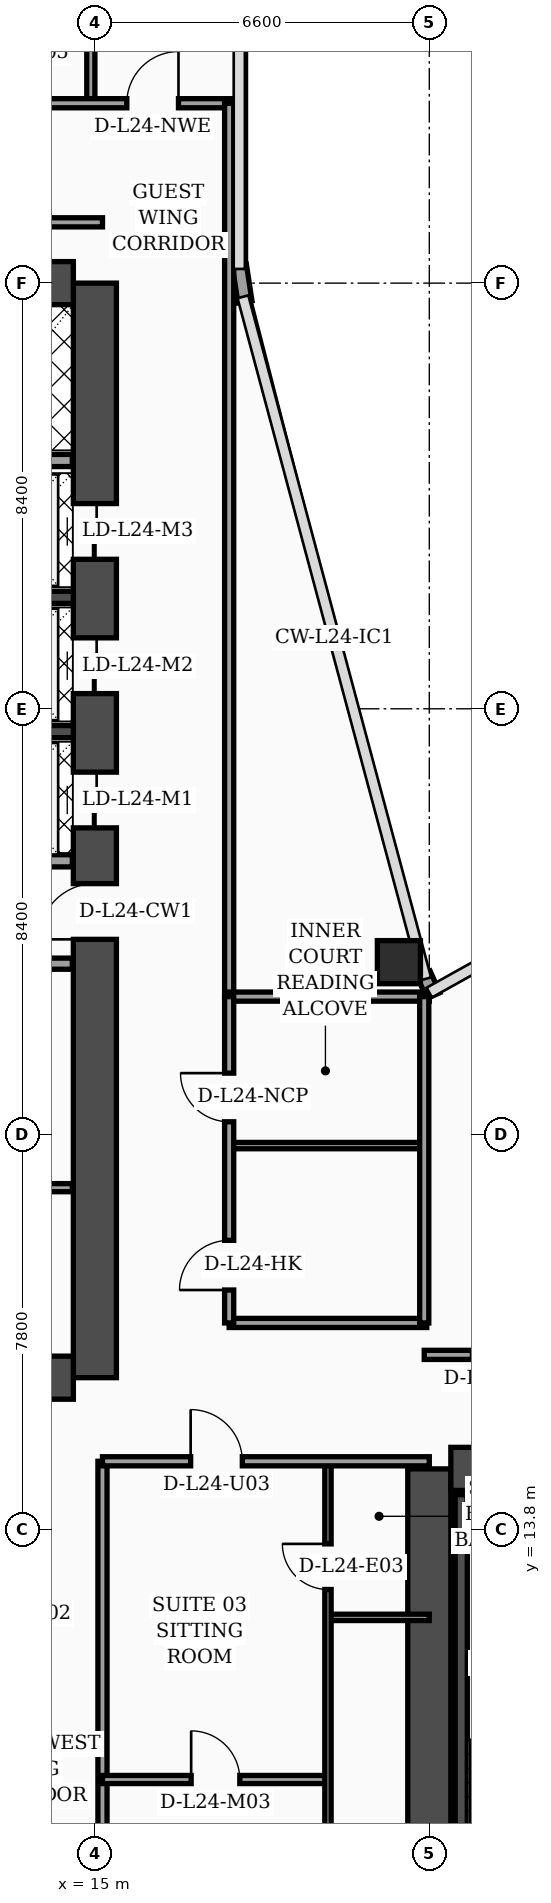
"""IFC4 building model, lengths in metres.
Left out: names, types, materials, properties, quantities, classifications, styles, units other than length and angle.
Written with IfcOpenShell. Run it as: python <this file> out.ifc"""

import sys

from ifc_helpers import new_model, si_unit, direction, frame, frame_2d, origin, origin_2d, place, context, subcontext, project, spatial, rectangle, hollow_rectangle, extrude, element, fill, save


model = new_model("IFC4")
c1 = context("Model", 3, precision=1e-05, world=origin(), true_north=direction((0.0, 1.0)))
c2 = subcontext(c1, "Body", "Model", "MODEL_VIEW")
j1 = project(units=[si_unit("LENGTHUNIT", "METRE"), si_unit("PLANEANGLEUNIT", "RADIAN")], contexts=[c1])
p1 = place(None, origin())
s1 = spatial("IfcSite", under=j1, at=p1, CompositionType="ELEMENT")
p2 = place(p1, origin())
s2 = spatial("IfcBuilding", under=s1, at=p2, CompositionType="ELEMENT")
p3 = place(p2, frame((0.0, 0.0, 101.2)))
s3 = spatial("IfcBuildingStorey", under=s2, at=p3, CompositionType="ELEMENT", Elevation=101.2)
p4 = place(p3, frame((15.0, 16.8, 0.0), z_axis=(0.0, 0.0, 1.0), x_axis=(0.0, 1.0, 0.0)))
e1 = element("IfcWall", 1, at=p4, inside=s3, PredefinedType="SHEAR", context=c2, shape_type="SweptSolid", body=[
    extrude(rectangle(XDim=21.6, YDim=0.85, at=frame_2d((10.8, 0.0))), origin(), (0.0, 0.0, 1.0), 3.56),
])
p5 = place(p4, frame((8.65, 0.0, 0.0)))
e2 = element("IfcOpeningElement", 2, at=p5, cuts=e1, PredefinedType="OPENING", context=c2, shape_type="SweptSolid", body=[
    extrude(rectangle(XDim=1.1, YDim=2.2, at=frame_2d((0.55, 1.1))), frame((0.0, 0.435, 0.0), z_axis=(0.0, -1.0, 0.0), x_axis=(1.0, 0.0, 0.0)), (0.0, 0.0, 1.0), 0.87),
])
p6 = place(p4, frame((10.85, 0.0, 0.0)))
e3 = element("IfcOpeningElement", 3, at=p6, cuts=e1, PredefinedType="OPENING", context=c2, shape_type="SweptSolid", body=[
    extrude(rectangle(XDim=1.1, YDim=2.2, at=frame_2d((0.55, 1.1))), frame((0.0, 0.435, 0.0), z_axis=(0.0, -1.0, 0.0), x_axis=(1.0, 0.0, 0.0)), (0.0, 0.0, 1.0), 0.87),
])
p7 = place(p4, frame((13.5, 0.0, 0.0)))
e4 = element("IfcOpeningElement", 4, at=p7, cuts=e1, PredefinedType="OPENING", context=c2, shape_type="SweptSolid", body=[
    extrude(rectangle(XDim=1.1, YDim=2.2, at=frame_2d((0.55, 1.1))), frame((0.0, 0.435, 0.0), z_axis=(0.0, -1.0, 0.0), x_axis=(1.0, 0.0, 0.0)), (0.0, 0.0, 1.0), 0.87),
])
p8 = place(p4, frame((16.15, 0.0, 0.0)))
e5 = element("IfcOpeningElement", 5, at=p8, cuts=e1, PredefinedType="OPENING", context=c2, shape_type="SweptSolid", body=[
    extrude(rectangle(XDim=1.1, YDim=2.2, at=frame_2d((0.55, 1.1))), frame((0.0, 0.435, 0.0), z_axis=(0.0, -1.0, 0.0), x_axis=(1.0, 0.0, 0.0)), (0.0, 0.0, 1.0), 0.87),
])
for number, where, z_axis, x_axis in (
    (6, (4.625, 38.4, 0.0), (0.0, 0.0, 1.0), (1.0, 0.0, 0.0)),
    (7, (4.625, 16.8, 0.0), (0.0, 0.0, 1.0), (1.0, 0.0, 0.0)),
):
    element("IfcWall", number, at=place(p3, frame(where, z_axis=z_axis, x_axis=x_axis)), inside=s3, PredefinedType="SHEAR", context=c2, shape_type="SweptSolid", body=[
        extrude(rectangle(XDim=9.95, YDim=0.85, at=frame_2d((4.975, 0.0))), origin(), (0.0, 0.0, 1.0), 3.56),
    ])
p9 = place(p3, frame((21.6, 4.6, 0.0), z_axis=(0.0, 0.0, 1.0), x_axis=(0.0, 1.0, 0.0)))
e8 = element("IfcWall", 8, at=p9, inside=s3, PredefinedType="SHEAR", context=c2, shape_type="SweptSolid", body=[
    extrude(rectangle(XDim=10.4, YDim=0.85, at=frame_2d((5.2, 0.0))), origin(), (0.0, 0.0, 1.0), 3.56),
])
p10 = place(p3, frame((22.025, 15.0, 0.0), z_axis=(0.0, 0.0, 1.0), x_axis=(1.0, 0.0, 0.0)))
e9 = element("IfcWall", 9, at=p10, inside=s3, PredefinedType="SHEAR", context=c2, shape_type="SweptSolid", body=[
    extrude(rectangle(XDim=9.95, YDim=0.85, at=frame_2d((4.975, 0.0))), origin(), (0.0, 0.0, 1.0), 3.56),
])
p11 = place(p10, frame((4.88, 0.0, 0.0)))
e10 = element("IfcOpeningElement", 10, at=p11, cuts=e9, PredefinedType="OPENING", context=c2, shape_type="SweptSolid", body=[
    extrude(rectangle(XDim=1.1, YDim=2.2, at=frame_2d((0.55, 1.1))), frame((0.0, 0.435, 0.0), z_axis=(0.0, -1.0, 0.0), x_axis=(1.0, 0.0, 0.0)), (0.0, 0.0, 1.0), 0.87),
])
p12 = place(p3, frame((22.23, 5.025, 0.0), z_axis=(0.0, 0.0, 1.0), x_axis=(0.0, 1.0, 0.0)))
e11 = element("IfcWall", 11, at=p12, inside=s3, PredefinedType="SOLIDWALL", context=c2, shape_type="SweptSolid", body=[
    extrude(rectangle(XDim=9.465, YDim=0.24, at=frame_2d((4.732, 0.0))), origin(), (0.0, 0.0, 1.0), 3.56),
])
p13 = place(p3, frame((22.35, 14.37, 0.0), z_axis=(0.0, 0.0, 1.0), x_axis=(1.0, 0.0, 0.0)))
e12 = element("IfcWall", 12, at=p13, inside=s3, PredefinedType="SOLIDWALL", context=c2, shape_type="SweptSolid", body=[
    extrude(rectangle(XDim=3.1, YDim=0.24, at=frame_2d((1.55, 0.0))), origin(), (0.0, 0.0, 1.0), 3.56),
])
for number, where, z_axis, x_axis in (
    (13, (12.18, 29.55, 0.0), (0.0, 0.0, 1.0), (1.0, 0.0, 0.0)),
    (14, (12.18, 32.2, 0.0), (0.0, 0.0, 1.0), (1.0, 0.0, 0.0)),
):
    element("IfcWall", number, at=place(p3, frame(where, z_axis=z_axis, x_axis=x_axis)), inside=s3, PredefinedType="SOLIDWALL", context=c2, shape_type="SweptSolid", body=[
        extrude(rectangle(XDim=2.395, YDim=0.24, at=frame_2d((1.198, 0.0))), origin(), (0.0, 0.0, 1.0), 3.56),
    ])
p14 = place(p3, frame((21.0, 25.0, 0.0), z_axis=(0.0, 0.0, 1.0), x_axis=(1.0, 0.0, 0.0)))
e15 = element("IfcColumn", 15, at=p14, inside=s3, PredefinedType="COLUMN", context=c2, shape_type="SweptSolid", body=[
    extrude(hollow_rectangle(XDim=0.85, YDim=0.85, WallThickness=0.036, at=origin_2d()), origin(), (0.0, 0.0, 1.0), 3.56),
])
p15 = place(p3, frame((21.68, 24.34, 0.0), z_axis=(0.0, 0.0, 1.0), x_axis=(-0.40758134973, 0.913168901875, 0.0)))
e16 = element("IfcWall", 16, at=p15, inside=s3, PredefinedType="SOLIDWALL", context=c2, shape_type="SweptSolid", body=[
    extrude(rectangle(XDim=0.471, YDim=0.28, at=frame_2d((0.235, 0.0))), origin(), (0.0, 0.0, 1.0), 3.56),
])
p16 = place(p3, frame((17.962, 38.03, 0.0), z_axis=(0.0, 0.0, 1.0), x_axis=(-0.15141125477, 0.988470855377, 0.0)))
e17 = element("IfcWall", 17, at=p16, inside=s3, PredefinedType="SOLIDWALL", context=c2, shape_type="SweptSolid", body=[
    extrude(rectangle(XDim=0.739, YDim=0.28, at=frame_2d((0.369, 0.0))), origin(), (0.0, 0.0, 1.0), 3.56),
])
p17 = place(p3, frame((9.68, 20.55, 0.0), z_axis=(0.0, 0.0, 1.0), x_axis=(1.0, 0.0, 0.0)))
e18 = element("IfcWall", 18, at=p17, inside=s3, PredefinedType="PARTITIONING", context=c2, shape_type="SweptSolid", body=[
    extrude(rectangle(XDim=4.875, YDim=0.16, at=frame_2d((2.438, 0.0))), origin(), (0.0, 0.0, 1.0), 3.56),
])
p18 = place(p17, frame((1.1, 0.0, 0.0)))
e19 = element("IfcOpeningElement", 19, at=p18, cuts=e18, PredefinedType="OPENING", context=c2, shape_type="SweptSolid", body=[
    extrude(rectangle(XDim=0.98, YDim=2.15, at=frame_2d((0.49, 1.075))), frame((0.0, 0.09, 0.0), z_axis=(0.0, -1.0, 0.0), x_axis=(1.0, 0.0, 0.0)), (0.0, 0.0, 1.0), 0.18),
])
p19 = place(p3, frame((9.68, 24.97, 0.0), z_axis=(0.0, 0.0, 1.0), x_axis=(1.0, 0.0, 0.0)))
e20 = element("IfcWall", 20, at=p19, inside=s3, PredefinedType="SOLIDWALL", context=c2, shape_type="SweptSolid", body=[
    extrude(rectangle(XDim=4.875, YDim=0.22, at=frame_2d((2.438, 0.0))), origin(), (0.0, 0.0, 1.0), 2.84),
])
p20 = place(p19, frame((0.9, 0.0, 0.0)))
e21 = element("IfcOpeningElement", 21, at=p20, cuts=e20, PredefinedType="OPENING", context=c2, shape_type="SweptSolid", body=[
    extrude(rectangle(XDim=0.98, YDim=2.15, at=frame_2d((0.49, 1.075))), frame((0.0, 0.12, 0.0), z_axis=(0.0, -1.0, 0.0), x_axis=(1.0, 0.0, 0.0)), (0.0, 0.0, 1.0), 0.24),
])
p21 = place(p3, frame((12.25, 27.0, 0.0), z_axis=(0.0, 0.0, 1.0), x_axis=(1.0, 0.0, 0.0)))
e22 = element("IfcWall", 22, at=p21, inside=s3, PredefinedType="SOLIDWALL", context=c2, shape_type="SweptSolid", body=[
    extrude(rectangle(XDim=2.305, YDim=0.24, at=frame_2d((1.152, 0.0))), origin(), (0.0, 0.0, 1.0), 3.56),
])
p22 = place(p3, frame((9.66, 34.9, 0.0), z_axis=(0.0, 0.0, 1.0), x_axis=(1.0, 0.0, 0.0)))
e23 = element("IfcWall", 23, at=p22, inside=s3, PredefinedType="SOLIDWALL", context=c2, shape_type="SweptSolid", body=[
    extrude(rectangle(XDim=4.895, YDim=0.24, at=frame_2d((2.448, 0.0))), origin(), (0.0, 0.0, 1.0), 3.56),
])
p23 = place(p3, frame((15.15, 2.44, 0.0), z_axis=(0.0, 0.0, 1.0), x_axis=(0.0, 1.0, 0.0)))
e24 = element("IfcWall", 24, at=p23, inside=s3, PredefinedType="PARTITIONING", context=c2, shape_type="SweptSolid", body=[
    extrude(rectangle(XDim=12.71, YDim=0.18, at=frame_2d((6.355, 0.0))), origin(), (0.0, 0.0, 1.0), 3.04),
])
p24 = place(p3, frame((19.6, 12.07, 0.0), z_axis=(0.0, 0.0, 1.0), x_axis=(1.0, 0.0, 0.0)))
e25 = element("IfcWall", 25, at=p24, inside=s3, PredefinedType="PARTITIONING", context=c2, shape_type="SweptSolid", body=[
    extrude(rectangle(XDim=2.0, YDim=0.125, at=frame_2d((1.0, 0.0))), origin(), (0.0, 0.0, 1.0), 3.56),
])
p25 = place(p3, frame((15.15, 8.87, 0.0), z_axis=(0.0, 0.0, 1.0), x_axis=(1.0, 0.0, 0.0)))
e26 = element("IfcWall", 26, at=p25, inside=s3, PredefinedType="PARTITIONING", context=c2, shape_type="SweptSolid", body=[
    extrude(rectangle(XDim=4.45, YDim=0.16, at=frame_2d((2.225, 0.0))), origin(), (0.0, 0.0, 1.0), 3.56),
])
p26 = place(p25, frame((1.75, 0.0, 0.0)))
e27 = element("IfcOpeningElement", 27, at=p26, cuts=e26, PredefinedType="OPENING", context=c2, shape_type="SweptSolid", body=[
    extrude(rectangle(XDim=0.96, YDim=2.2, at=frame_2d((0.48, 1.1))), frame((0.0, 0.09, 0.0), z_axis=(0.0, -1.0, 0.0), x_axis=(1.0, 0.0, 0.0)), (0.0, 0.0, 1.0), 0.18),
])
p27 = place(p3, frame((19.6, 2.44, 0.0), z_axis=(0.0, 0.0, 1.0), x_axis=(0.0, 1.0, 0.0)))
e28 = element("IfcWall", 28, at=p27, inside=s3, PredefinedType="PARTITIONING", context=c2, shape_type="SweptSolid", body=[
    extrude(rectangle(XDim=12.71, YDim=0.125, at=frame_2d((6.355, 0.0))), origin(), (0.0, 0.0, 1.0), 2.49),
])
p28 = place(p27, frame((4.34, 0.0, 0.0)))
e29 = element("IfcOpeningElement", 29, at=p28, cuts=e28, PredefinedType="OPENING", context=c2, shape_type="SweptSolid", body=[
    extrude(rectangle(XDim=0.96, YDim=2.2, at=frame_2d((0.48, 1.1))), frame((0.0, 0.073, 0.0), z_axis=(0.0, -1.0, 0.0), x_axis=(1.0, 0.0, 0.0)), (0.0, 0.0, 1.0), 0.145),
])
p29 = place(p27, frame((10.18, 0.0, 0.0)))
e30 = element("IfcOpeningElement", 30, at=p29, cuts=e28, PredefinedType="OPENING", context=c2, shape_type="SweptSolid", body=[
    extrude(rectangle(XDim=0.9, YDim=2.15, at=frame_2d((0.45, 1.075))), frame((0.0, 0.073, 0.0), z_axis=(0.0, -1.0, 0.0), x_axis=(1.0, 0.0, 0.0)), (0.0, 0.0, 1.0), 0.145),
])
p30 = place(p3, frame((15.15, 15.15, 0.0), z_axis=(0.0, 0.0, 1.0), x_axis=(1.0, 0.0, 0.0)))
e31 = element("IfcWall", 31, at=p30, inside=s3, PredefinedType="PARTITIONING", context=c2, shape_type="SweptSolid", body=[
    extrude(rectangle(XDim=6.45, YDim=0.18, at=frame_2d((3.225, 0.0))), origin(), (0.0, 0.0, 1.0), 2.49),
])
p31 = place(p30, frame((1.74, 0.0, 0.0)))
e32 = element("IfcOpeningElement", 32, at=p31, cuts=e31, PredefinedType="OPENING", context=c2, shape_type="SweptSolid", body=[
    extrude(rectangle(XDim=1.02, YDim=2.2, at=frame_2d((0.51, 1.1))), frame((0.0, 0.1, 0.0), z_axis=(0.0, -1.0, 0.0), x_axis=(1.0, 0.0, 0.0)), (0.0, 0.0, 1.0), 0.2),
])
p32 = place(p3, frame((14.92, 41.95, 0.0), z_axis=(0.0, 0.0, 1.0), x_axis=(0.0, 1.0, 0.0)))
e33 = element("IfcWall", 33, at=p32, inside=s3, PredefinedType="PARTITIONING", context=c2, shape_type="SweptSolid", body=[
    extrude(rectangle(XDim=5.85, YDim=0.16, at=frame_2d((2.925, 0.0))), origin(), (0.0, 0.0, 1.0), 3.04),
])
p33 = place(p3, frame((0.08, 41.95, 0.0), z_axis=(0.0, 0.0, 1.0), x_axis=(1.0, 0.0, 0.0)))
e34 = element("IfcWall", 34, at=p33, inside=s3, PredefinedType="PARTITIONING", context=c2, shape_type="SweptSolid", body=[
    extrude(rectangle(XDim=17.77, YDim=0.18, at=frame_2d((8.885, 0.0))), origin(), (0.0, 0.0, 1.0), 2.84),
])
p34 = place(p33, frame((0.9, 0.0, 0.0)))
e35 = element("IfcOpeningElement", 35, at=p34, cuts=e34, PredefinedType="OPENING", context=c2, shape_type="SweptSolid", body=[
    extrude(rectangle(XDim=1.02, YDim=2.2, at=frame_2d((0.51, 1.1))), frame((0.0, 0.1, 0.0), z_axis=(0.0, -1.0, 0.0), x_axis=(1.0, 0.0, 0.0)), (0.0, 0.0, 1.0), 0.2),
])
p35 = place(p33, frame((4.45, 0.0, 0.0)))
e36 = element("IfcOpeningElement", 36, at=p35, cuts=e34, PredefinedType="OPENING", context=c2, shape_type="SweptSolid", body=[
    extrude(rectangle(XDim=1.02, YDim=2.2, at=frame_2d((0.51, 1.1))), frame((0.0, 0.1, 0.0), z_axis=(0.0, -1.0, 0.0), x_axis=(1.0, 0.0, 0.0)), (0.0, 0.0, 1.0), 0.2),
])
p36 = place(p33, frame((10.33, 0.0, 0.0)))
e37 = element("IfcOpeningElement", 37, at=p36, cuts=e34, PredefinedType="OPENING", context=c2, shape_type="SweptSolid", body=[
    extrude(rectangle(XDim=1.02, YDim=2.2, at=frame_2d((0.51, 1.1))), frame((0.0, 0.1, 0.0), z_axis=(0.0, -1.0, 0.0), x_axis=(1.0, 0.0, 0.0)), (0.0, 0.0, 1.0), 0.2),
])
p37 = place(p33, frame((15.55, 0.0, 0.0)))
e38 = element("IfcOpeningElement", 38, at=p37, cuts=e34, PredefinedType="OPENING", context=c2, shape_type="SweptSolid", body=[
    extrude(rectangle(XDim=1.02, YDim=2.2, at=frame_2d((0.51, 1.1))), frame((0.0, 0.1, 0.0), z_axis=(0.0, -1.0, 0.0), x_axis=(1.0, 0.0, 0.0)), (0.0, 0.0, 1.0), 0.2),
])
p38 = place(p3, frame((17.65, 24.3, 0.0), z_axis=(0.0, 0.0, 1.0), x_axis=(0.0, 1.0, 0.0)))
e39 = element("IfcWall", 39, at=p38, inside=s3, PredefinedType="PARTITIONING", context=c2, shape_type="SweptSolid", body=[
    extrude(rectangle(XDim=17.65, YDim=0.18, at=frame_2d((8.825, 0.0))), origin(), (0.0, 0.0, 1.0), 2.84),
])
p39 = place(p3, frame((3.755, 39.6, 0.0), z_axis=(0.0, 0.0, 1.0), x_axis=(1.0, 0.0, 0.0)))
e40 = element("IfcWall", 40, at=p39, inside=s3, PredefinedType="PARTITIONING", context=c2, shape_type="SweptSolid", body=[
    extrude(rectangle(XDim=11.395, YDim=0.18, at=frame_2d((5.698, 0.0))), origin(), (0.0, 0.0, 1.0), 2.84),
])
p40 = place(p3, frame((17.65, 17.88, 0.0), z_axis=(0.0, 0.0, 1.0), x_axis=(1.0, 0.0, 0.0)))
e41 = element("IfcWall", 41, at=p40, inside=s3, PredefinedType="PARTITIONING", context=c2, shape_type="SweptSolid", body=[
    extrude(rectangle(XDim=3.9, YDim=0.18, at=frame_2d((1.95, 0.0))), origin(), (0.0, 0.0, 1.0), 3.09),
])
p41 = place(p3, frame((17.65, 21.38, 0.0), z_axis=(0.0, 0.0, 1.0), x_axis=(1.0, 0.0, 0.0)))
e42 = element("IfcWall", 42, at=p41, inside=s3, PredefinedType="PARTITIONING", context=c2, shape_type="SweptSolid", body=[
    extrude(rectangle(XDim=3.9, YDim=0.125, at=frame_2d((1.95, 0.0))), origin(), (0.0, 0.0, 1.0), 3.56),
])
p42 = place(p3, frame((17.65, 24.32, 0.0), z_axis=(0.0, 0.0, 1.0), x_axis=(1.0, 0.0, 0.0)))
e43 = element("IfcWall", 43, at=p42, inside=s3, PredefinedType="PARTITIONING", context=c2, shape_type="SweptSolid", body=[
    extrude(rectangle(XDim=3.95, YDim=0.18, at=frame_2d((1.975, 0.0))), origin(), (0.0, 0.0, 1.0), 3.56),
])
p43 = place(p3, frame((21.5, 17.88, 0.0), z_axis=(0.0, 0.0, 1.0), x_axis=(0.0, 1.0, 0.0)))
e44 = element("IfcWall", 44, at=p43, inside=s3, PredefinedType="PARTITIONING", context=c2, shape_type="SweptSolid", body=[
    extrude(rectangle(XDim=6.44, YDim=0.18, at=frame_2d((3.22, 0.0))), origin(), (0.0, 0.0, 1.0), 3.09),
])
p44 = place(p3, frame((17.65, 17.88, 0.0), z_axis=(0.0, 0.0, 1.0), x_axis=(0.0, 1.0, 0.0)))
e45 = element("IfcWall", 45, at=p44, inside=s3, PredefinedType="PARTITIONING", context=c2, shape_type="SweptSolid", body=[
    extrude(rectangle(XDim=6.44, YDim=0.18, at=frame_2d((3.22, 0.0))), origin(), (0.0, 0.0, 1.0), 3.09),
])
p45 = place(p44, frame((0.65, 0.0, 0.0)))
e46 = element("IfcOpeningElement", 46, at=p45, cuts=e45, PredefinedType="OPENING", context=c2, shape_type="SweptSolid", body=[
    extrude(rectangle(XDim=0.98, YDim=2.15, at=frame_2d((0.49, 1.075))), frame((0.0, 0.1, 0.0), z_axis=(0.0, -1.0, 0.0), x_axis=(1.0, 0.0, 0.0)), (0.0, 0.0, 1.0), 0.2),
])
p46 = place(p44, frame((3.97, 0.0, 0.0)))
e47 = element("IfcOpeningElement", 47, at=p46, cuts=e45, PredefinedType="OPENING", context=c2, shape_type="SweptSolid", body=[
    extrude(rectangle(XDim=0.96, YDim=2.2, at=frame_2d((0.48, 1.1))), frame((0.0, 0.1, 0.0), z_axis=(0.0, -1.0, 0.0), x_axis=(1.0, 0.0, 0.0)), (0.0, 0.0, 1.0), 0.2),
])
p47 = place(p3, frame((21.5, 17.25, 0.0), z_axis=(0.0, 0.0, 1.0), x_axis=(1.0, 0.0, 0.0)))
e48 = element("IfcWall", 48, at=p47, inside=s3, PredefinedType="PARTITIONING", context=c2, shape_type="SweptSolid", body=[
    extrude(rectangle(XDim=24.25, YDim=0.18, at=frame_2d((12.125, 0.0))), origin(), (0.0, 0.0, 1.0), 2.84),
])
p48 = place(p47, frame((0.95, 0.0, 0.0)))
e49 = element("IfcOpeningElement", 49, at=p48, cuts=e48, PredefinedType="OPENING", context=c2, shape_type="SweptSolid", body=[
    extrude(rectangle(XDim=1.02, YDim=2.2, at=frame_2d((0.51, 1.1))), frame((0.0, 0.1, 0.0), z_axis=(0.0, -1.0, 0.0), x_axis=(1.0, 0.0, 0.0)), (0.0, 0.0, 1.0), 0.2),
])
p49 = place(p47, frame((9.65, 0.0, 0.0)))
e50 = element("IfcOpeningElement", 50, at=p49, cuts=e48, PredefinedType="OPENING", context=c2, shape_type="SweptSolid", body=[
    extrude(rectangle(XDim=1.02, YDim=2.2, at=frame_2d((0.51, 1.1))), frame((0.0, 0.1, 0.0), z_axis=(0.0, -1.0, 0.0), x_axis=(1.0, 0.0, 0.0)), (0.0, 0.0, 1.0), 0.2),
])
p50 = place(p47, frame((17.05, 0.0, 0.0)))
e51 = element("IfcOpeningElement", 51, at=p50, cuts=e48, PredefinedType="OPENING", context=c2, shape_type="SweptSolid", body=[
    extrude(rectangle(XDim=1.02, YDim=2.2, at=frame_2d((0.51, 1.1))), frame((0.0, 0.1, 0.0), z_axis=(0.0, -1.0, 0.0), x_axis=(1.0, 0.0, 0.0)), (0.0, 0.0, 1.0), 0.2),
])
p51 = place(p26, origin())
e52 = element("IfcDoor", 52, at=p51, inside=s3, OperationType="SINGLE_SWING_LEFT", PredefinedType="DOOR", context=c2, shape_type="SweptSolid", body=[
    extrude(rectangle(XDim=0.96, YDim=2.2, at=frame_2d((0.48, 1.1))), frame((0.0, 0.025, 0.0), z_axis=(0.0, -1.0, 0.0), x_axis=(1.0, 0.0, 0.0)), (0.0, 0.0, 1.0), 0.05),
])
fill(e27, e52)
p52 = place(p29, origin())
e53 = element("IfcDoor", 53, at=p52, inside=s3, OperationType="SINGLE_SWING_RIGHT", PredefinedType="DOOR", context=c2, shape_type="SweptSolid", body=[
    extrude(rectangle(XDim=0.9, YDim=2.15, at=frame_2d((0.45, 1.075))), frame((0.0, 0.025, 0.0), z_axis=(0.0, -1.0, 0.0), x_axis=(1.0, 0.0, 0.0)), (0.0, 0.0, 1.0), 0.05),
])
fill(e30, e53)
p53 = place(p31, origin())
e54 = element("IfcDoor", 54, at=p53, inside=s3, OperationType="SINGLE_SWING_LEFT", PredefinedType="DOOR", context=c2, shape_type="SweptSolid", body=[
    extrude(rectangle(XDim=1.02, YDim=2.2, at=frame_2d((0.51, 1.1))), frame((0.0, 0.025, 0.0), z_axis=(0.0, -1.0, 0.0), x_axis=(1.0, 0.0, 0.0)), (0.0, 0.0, 1.0), 0.05),
])
fill(e32, e54)
p54 = place(p37, origin())
e55 = element("IfcDoor", 55, at=p54, inside=s3, OperationType="SINGLE_SWING_RIGHT", PredefinedType="DOOR", context=c2, shape_type="SweptSolid", body=[
    extrude(rectangle(XDim=1.02, YDim=2.2, at=frame_2d((0.51, 1.1))), frame((0.0, 0.025, 0.0), z_axis=(0.0, -1.0, 0.0), x_axis=(1.0, 0.0, 0.0)), (0.0, 0.0, 1.0), 0.05),
])
fill(e38, e55)
p55 = place(p45, origin())
e56 = element("IfcDoor", 56, at=p55, inside=s3, OperationType="SINGLE_SWING_LEFT", PredefinedType="DOOR", context=c2, shape_type="SweptSolid", body=[
    extrude(rectangle(XDim=0.98, YDim=2.15, at=frame_2d((0.49, 1.075))), frame((0.0, 0.025, 0.0), z_axis=(0.0, -1.0, 0.0), x_axis=(1.0, 0.0, 0.0)), (0.0, 0.0, 1.0), 0.05),
])
fill(e46, e56)
p56 = place(p46, origin())
e57 = element("IfcDoor", 57, at=p56, inside=s3, OperationType="SINGLE_SWING_RIGHT", PredefinedType="DOOR", context=c2, shape_type="SweptSolid", body=[
    extrude(rectangle(XDim=0.96, YDim=2.2, at=frame_2d((0.48, 1.1))), frame((0.0, 0.025, 0.0), z_axis=(0.0, -1.0, 0.0), x_axis=(1.0, 0.0, 0.0)), (0.0, 0.0, 1.0), 0.05),
])
fill(e47, e57)
p57 = place(p5, origin())
e58 = element("IfcDoor", 58, at=p57, inside=s3, OperationType="SINGLE_SWING_LEFT", PredefinedType="DOOR", context=c2, shape_type="SweptSolid", body=[
    extrude(rectangle(XDim=1.1, YDim=2.2, at=frame_2d((0.55, 1.1))), frame((0.0, 0.025, 0.0), z_axis=(0.0, -1.0, 0.0), x_axis=(1.0, 0.0, 0.0)), (0.0, 0.0, 1.0), 0.05),
])
fill(e2, e58)
p58 = place(p6, origin())
e59 = element("IfcDoor", 59, at=p58, inside=s3, OperationType="DOUBLE_DOOR_SLIDING", PredefinedType="DOOR", context=c2, shape_type="SweptSolid", body=[
    extrude(rectangle(XDim=1.1, YDim=2.2, at=frame_2d((0.55, 1.1))), frame((0.0, 0.025, 0.0), z_axis=(0.0, -1.0, 0.0), x_axis=(1.0, 0.0, 0.0)), (0.0, 0.0, 1.0), 0.05),
])
fill(e3, e59)
p59 = place(p7, origin())
e60 = element("IfcDoor", 60, at=p59, inside=s3, OperationType="DOUBLE_DOOR_SLIDING", PredefinedType="DOOR", context=c2, shape_type="SweptSolid", body=[
    extrude(rectangle(XDim=1.1, YDim=2.2, at=frame_2d((0.55, 1.1))), frame((0.0, 0.025, 0.0), z_axis=(0.0, -1.0, 0.0), x_axis=(1.0, 0.0, 0.0)), (0.0, 0.0, 1.0), 0.05),
])
fill(e4, e60)
p60 = place(p8, origin())
e61 = element("IfcDoor", 61, at=p60, inside=s3, OperationType="DOUBLE_DOOR_SLIDING", PredefinedType="DOOR", context=c2, shape_type="SweptSolid", body=[
    extrude(rectangle(XDim=1.1, YDim=2.2, at=frame_2d((0.55, 1.1))), frame((0.0, 0.025, 0.0), z_axis=(0.0, -1.0, 0.0), x_axis=(1.0, 0.0, 0.0)), (0.0, 0.0, 1.0), 0.05),
])
fill(e5, e61)
save(model, sys.argv[1])
